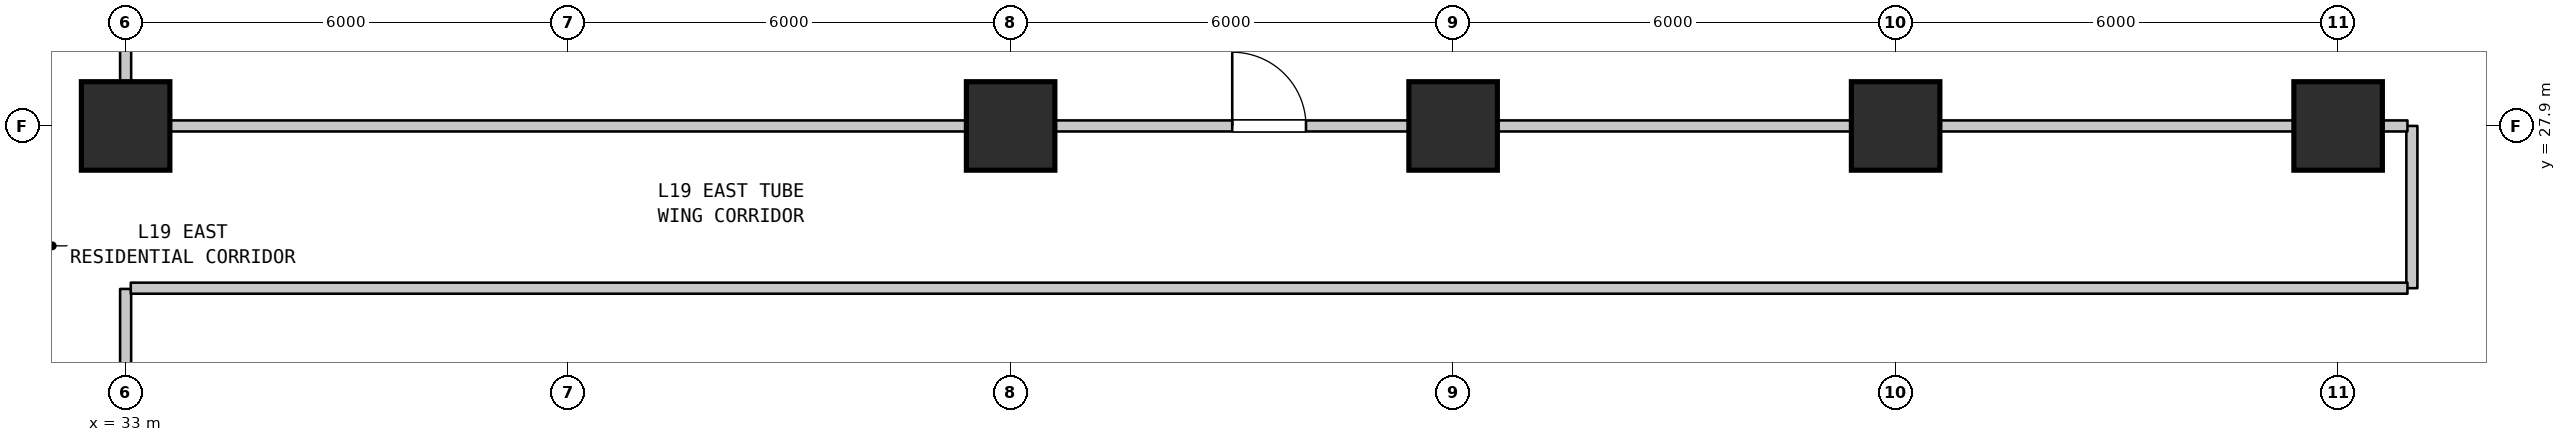
"""IFC4 building model, lengths in metres.
Left out: names, types, materials, properties, quantities, classifications, styles, units other than length and angle.
Written with IfcOpenShell. Run it as: python <this file> out.ifc"""

import sys

from ifc_helpers import new_model, si_unit, direction, frame, frame_2d, origin, origin_2d, place, context, subcontext, project, spatial, rectangle, extrude, element, fill, save


model = new_model("IFC4")
c1 = context("Model", 3, precision=1e-05, world=origin(), true_north=direction((0.0, 1.0)))
c2 = subcontext(c1, "Body", "Model", "MODEL_VIEW")
j1 = project(units=[si_unit("LENGTHUNIT", "METRE"), si_unit("PLANEANGLEUNIT", "RADIAN")], contexts=[c1])
p1 = place(None, origin())
s1 = spatial("IfcSite", under=j1, at=p1, CompositionType="ELEMENT")
p2 = place(p1, origin())
s2 = spatial("IfcBuilding", under=s1, at=p2, CompositionType="ELEMENT")
p3 = place(p2, frame((0.0, 0.0, 81.2)))
s3 = spatial("IfcBuildingStorey", under=s2, at=p3, CompositionType="ELEMENT", Elevation=81.2)
for number, where, z_axis, x_axis in (
    (1, (33.0, 27.9, 0.0), (0.0, 0.0, 1.0), (1.0, 0.0, 0.0)),
    (2, (45.0, 27.9, 0.0), (0.0, 0.0, 1.0), (1.0, 0.0, 0.0)),
    (3, (51.0, 27.9, 0.0), (0.0, 0.0, 1.0), (1.0, 0.0, 0.0)),
    (4, (57.0, 27.9, 0.0), (0.0, 0.0, 1.0), (1.0, 0.0, 0.0)),
    (5, (63.0, 27.9, 0.0), (0.0, 0.0, 1.0), (1.0, 0.0, 0.0)),
):
    element("IfcColumn", number, at=place(p3, frame(where, z_axis=z_axis, x_axis=x_axis)), inside=s3, PredefinedType="COLUMN", context=c2, shape_type="SweptSolid", body=[
        extrude(rectangle(XDim=1.2, YDim=1.2, at=origin_2d()), origin(), (0.0, 0.0, 1.0), 5.2),
    ])
p4 = place(p3, frame((33.0, 19.51, 0.0), z_axis=(0.0, 0.0, 1.0), x_axis=(0.0, 1.0, 0.0)))
e6 = element("IfcWall", 6, at=p4, inside=s3, PredefinedType="STANDARD", context=c2, shape_type="SweptSolid", body=[
    extrude(rectangle(XDim=6.18, YDim=0.15, at=frame_2d((3.09, 0.0))), origin(), (0.0, 0.0, 1.0), 4.435),
])
p5 = place(p3, frame((33.0, 27.91, 0.0), z_axis=(0.0, 0.0, 1.0), x_axis=(0.0, 1.0, 0.0)))
e7 = element("IfcWall", 7, at=p5, inside=s3, PredefinedType="STANDARD", context=c2, shape_type="SweptSolid", body=[
    extrude(rectangle(XDim=9.98, YDim=0.15, at=frame_2d((4.99, 0.0))), origin(), (0.0, 0.0, 1.0), 4.385),
])
p6 = place(p3, frame((64.0, 25.7, 0.0), z_axis=(0.0, 0.0, 1.0), x_axis=(0.0, 1.0, 0.0)))
e8 = element("IfcWall", 8, at=p6, inside=s3, PredefinedType="STANDARD", context=c2, shape_type="SweptSolid", body=[
    extrude(rectangle(XDim=2.2, YDim=0.15, at=frame_2d((1.1, 0.0))), origin(), (0.0, 0.0, 1.0), 4.885),
])
p7 = place(p3, frame((33.07, 25.7, 0.0), z_axis=(0.0, 0.0, 1.0), x_axis=(1.0, 0.0, 0.0)))
e9 = element("IfcWall", 9, at=p7, inside=s3, PredefinedType="STANDARD", context=c2, shape_type="SweptSolid", body=[
    extrude(rectangle(XDim=30.87, YDim=0.15, at=frame_2d((15.435, 0.0))), origin(), (0.0, 0.0, 1.0), 4.885),
])
p8 = place(p3, frame((33.07, 27.9, 0.0), z_axis=(0.0, 0.0, 1.0), x_axis=(1.0, 0.0, 0.0)))
e10 = element("IfcWall", 10, at=p8, inside=s3, PredefinedType="STANDARD", context=c2, shape_type="SweptSolid", body=[
    extrude(rectangle(XDim=11.93, YDim=0.15, at=frame_2d((5.965, 0.0))), origin(), (0.0, 0.0, 1.0), 4.385),
])
p9 = place(p3, frame((45.0, 27.9, 0.0), z_axis=(0.0, 0.0, 1.0), x_axis=(1.0, 0.0, 0.0)))
e11 = element("IfcWall", 11, at=p9, inside=s3, PredefinedType="STANDARD", context=c2, shape_type="SweptSolid", body=[
    extrude(rectangle(XDim=12.0, YDim=0.15, at=frame_2d((6.0, 0.0))), origin(), (0.0, 0.0, 1.0), 4.435),
])
p10 = place(p9, frame((3.005, 0.0, 0.0)))
e12 = element("IfcOpeningElement", 12, at=p10, cuts=e11, PredefinedType="OPENING", context=c2, shape_type="SweptSolid", body=[
    extrude(rectangle(XDim=1.0, YDim=2.15, at=frame_2d((0.5, 1.075))), frame((0.0, 0.085, 0.0), z_axis=(0.0, -1.0, 0.0), x_axis=(1.0, 0.0, 0.0)), (0.0, 0.0, 1.0), 0.17),
])
p11 = place(p3, frame((57.0, 27.9, 0.0), z_axis=(0.0, 0.0, 1.0), x_axis=(1.0, 0.0, 0.0)))
e13 = element("IfcWall", 13, at=p11, inside=s3, PredefinedType="STANDARD", context=c2, shape_type="SweptSolid", body=[
    extrude(rectangle(XDim=6.94, YDim=0.15, at=frame_2d((3.47, 0.0))), origin(), (0.0, 0.0, 1.0), 4.885),
])
p12 = place(p10, origin())
e14 = element("IfcDoor", 14, at=p12, inside=s3, OperationType="SINGLE_SWING_LEFT", PredefinedType="DOOR", context=c2, shape_type="SweptSolid", body=[
    extrude(rectangle(XDim=1.0, YDim=2.15, at=frame_2d((0.5, 1.075))), frame((0.0, 0.025, 0.0), z_axis=(0.0, -1.0, 0.0), x_axis=(1.0, 0.0, 0.0)), (0.0, 0.0, 1.0), 0.05),
])
fill(e12, e14)
save(model, sys.argv[1])
